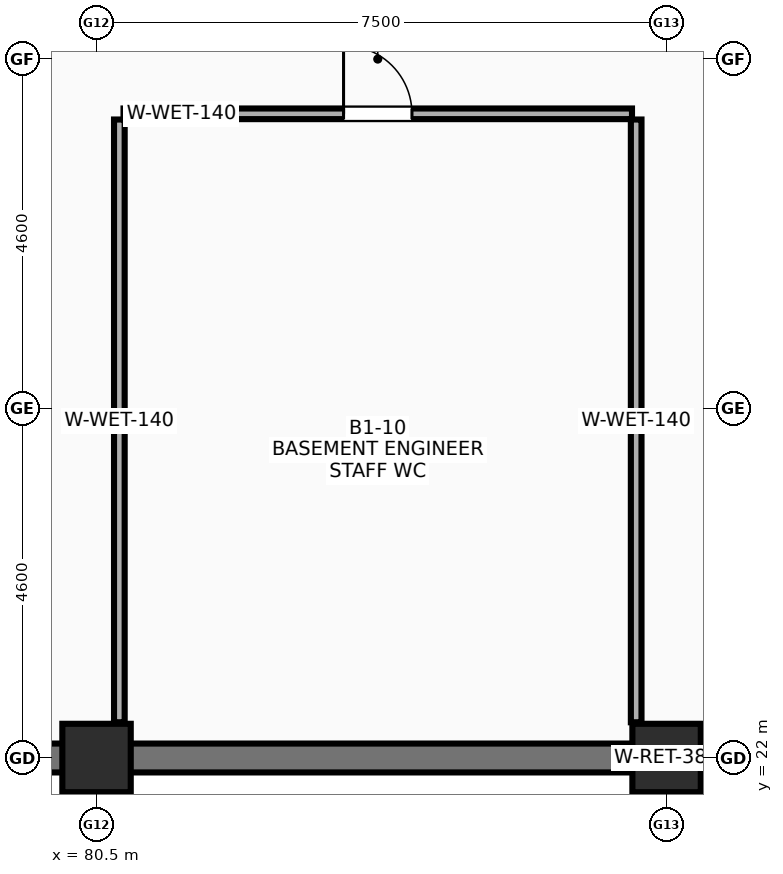
"""IFC4 building model, lengths in metres.
Left out: names, types, materials, properties, quantities, classifications, styles, units other than length and angle.
Written with IfcOpenShell. Run it as: python <this file> out.ifc"""

import sys

from ifc_helpers import new_model, si_unit, direction, frame, frame_2d, origin, origin_2d, place, context, subcontext, project, spatial, rectangle, extrude, element, fill, save


model = new_model("IFC4")
c1 = context("Model", 3, precision=1e-05, world=origin(), true_north=direction((0.0, 1.0)))
c2 = subcontext(c1, "Body", "Model", "MODEL_VIEW")
j1 = project(units=[si_unit("LENGTHUNIT", "METRE"), si_unit("PLANEANGLEUNIT", "RADIAN")], contexts=[c1])
p1 = place(None, origin())
s1 = spatial("IfcSite", under=j1, at=p1, CompositionType="ELEMENT")
p2 = place(p1, origin())
s2 = spatial("IfcBuilding", under=s1, at=p2, CompositionType="ELEMENT")
p3 = place(p2, frame((0.0, 0.0, -4.2)))
s3 = spatial("IfcBuildingStorey", under=s2, at=p3, CompositionType="ELEMENT", Elevation=-4.2)
for number, where, z_axis, x_axis in (
    (1, (80.5, 22.0, -0.42), (0.0, 0.0, 1.0), (1.0, 0.0, 0.0)),
    (2, (88.0, 22.0, -0.42), (0.0, 0.0, 1.0), (1.0, 0.0, 0.0)),
):
    element("IfcColumn", number, at=place(p3, frame(where, z_axis=z_axis, x_axis=x_axis)), inside=s3, PredefinedType="COLUMN", context=c2, shape_type="SweptSolid", body=[
        extrude(rectangle(XDim=0.9, YDim=0.9, at=origin_2d()), origin(), (0.0, 0.0, 1.0), 4.62),
    ])
p4 = place(p3, frame((80.855, 30.475, 0.0), z_axis=(0.0, 0.0, 1.0), x_axis=(1.0, 0.0, 0.0)))
e3 = element("IfcWall", 3, at=p4, inside=s3, PredefinedType="PARTITIONING", context=c2, shape_type="SweptSolid", body=[
    extrude(rectangle(XDim=6.69, YDim=0.14, at=frame_2d((3.345, 0.0))), origin(), (0.0, 0.0, 1.0), 3.82),
])
p5 = place(p4, frame((2.895, 0.0, 0.0)))
e4 = element("IfcOpeningElement", 4, at=p5, cuts=e3, PredefinedType="OPENING", context=c2, shape_type="SweptSolid", body=[
    extrude(rectangle(XDim=0.9, YDim=2.1, at=frame_2d((0.45, 1.05))), frame((0.0, 0.08, 0.0), z_axis=(0.0, -1.0, 0.0), x_axis=(1.0, 0.0, 0.0)), (0.0, 0.0, 1.0), 0.16),
])
for number, where, z_axis, x_axis in (
    (5, (80.8, 22.47, 0.0), (0.0, 0.0, 1.0), (0.0, 1.0, 0.0)),
    (6, (87.6, 22.47, 0.0), (0.0, 0.0, 1.0), (0.0, 1.0, 0.0)),
):
    element("IfcWall", number, at=place(p3, frame(where, z_axis=z_axis, x_axis=x_axis)), inside=s3, PredefinedType="PARTITIONING", context=c2, shape_type="SweptSolid", body=[
        extrude(rectangle(XDim=7.93, YDim=0.14, at=frame_2d((3.965, 0.0))), origin(), (0.0, 0.0, 1.0), 2.66),
    ])
p6 = place(p3, frame((55.92, 22.0, -0.42), z_axis=(0.0, 0.0, 1.0), x_axis=(1.0, 0.0, 0.0)))
e7 = element("IfcWall", 7, at=p6, inside=s3, PredefinedType="SHEAR", context=c2, shape_type="SweptSolid", body=[
    extrude(rectangle(XDim=64.16, YDim=0.38, at=frame_2d((32.08, 0.0))), origin(), (0.0, 0.0, 1.0), 4.3),
])
p7 = place(p5, origin())
e8 = element("IfcDoor", 8, at=p7, inside=s3, OperationType="SINGLE_SWING_LEFT", PredefinedType="DOOR", context=c2, shape_type="SweptSolid", body=[
    extrude(rectangle(XDim=0.9, YDim=2.1, at=frame_2d((0.45, 1.05))), frame((0.0, 0.025, 0.0), z_axis=(0.0, -1.0, 0.0), x_axis=(1.0, 0.0, 0.0)), (0.0, 0.0, 1.0), 0.05),
])
fill(e4, e8)
save(model, sys.argv[1])
